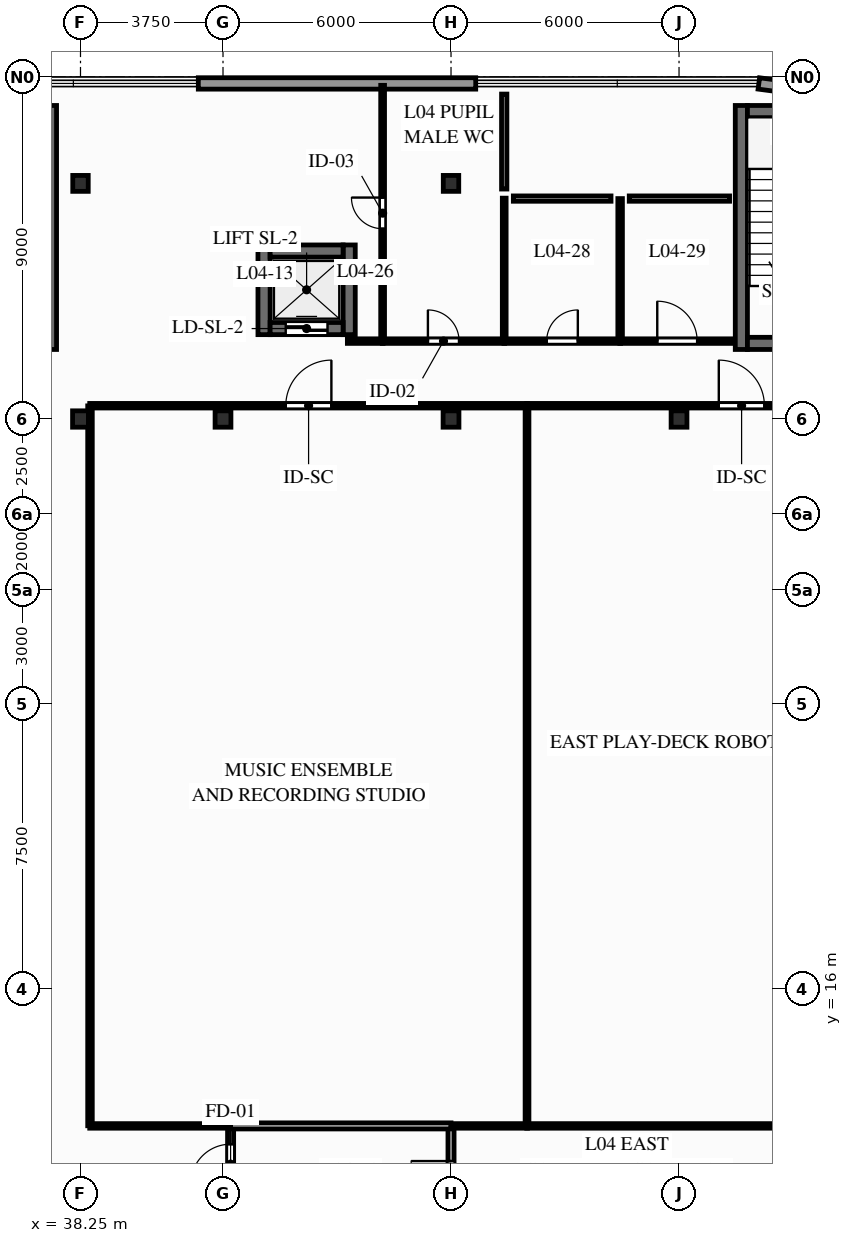
"""IFC4 building model, lengths in metres.
Left out: names, types, materials, properties, quantities, classifications, styles, units other than length and angle.
Written with IfcOpenShell. Run it as: python <this file> out.ifc"""

import sys

from ifc_helpers import new_model, si_unit, direction, frame, frame_2d, origin, origin_2d, place, context, subcontext, project, spatial, rectangle, i_section, extrude, element, fill, save


model = new_model("IFC4")
c1 = context("Model", 3, precision=1e-05, world=origin(), true_north=direction((0.0, 1.0)))
c2 = subcontext(c1, "Body", "Model", "MODEL_VIEW")
j1 = project(units=[si_unit("LENGTHUNIT", "METRE"), si_unit("PLANEANGLEUNIT", "RADIAN")], contexts=[c1])
p1 = place(None, origin())
s1 = spatial("IfcSite", under=j1, at=p1, CompositionType="ELEMENT")
p2 = place(p1, origin())
s2 = spatial("IfcBuilding", under=s1, at=p2, CompositionType="ELEMENT")
p3 = place(p2, frame((0.0, 0.0, 18.0)))
s3 = spatial("IfcBuildingStorey", under=s2, at=p3, CompositionType="ELEMENT", Elevation=18.0)
p4 = place(p3, frame((38.25, 31.0, 0.0), z_axis=(0.0, 0.0, 1.0), x_axis=(1.0, 0.0, 0.0)))
e1 = element("IfcColumn", 1, at=p4, inside=s3, PredefinedType="COLUMN", context=c2, shape_type="SweptSolid", body=[
    extrude(i_section(OverallWidth=0.417, OverallDepth=0.431, WebThickness=0.065, FlangeThickness=0.106, FilletRadius=0.015, at=origin_2d()), origin(), (0.0, 0.0, 1.0), 4.5),
])
p5 = place(p3, frame((38.25, 37.2, 0.0), z_axis=(0.0, 0.0, 1.0), x_axis=(1.0, 0.0, 0.0)))
e2 = element("IfcColumn", 2, at=p5, inside=s3, PredefinedType="COLUMN", context=c2, shape_type="SweptSolid", body=[
    extrude(i_section(OverallWidth=0.407, OverallDepth=0.419, WebThickness=0.031, FlangeThickness=0.049, FilletRadius=0.015, at=origin_2d()), origin(), (0.0, 0.0, 1.0), 4.5),
])
for number, where, z_axis, x_axis in (
    (3, (42.0, 31.0, 0.0), (0.0, 0.0, 1.0), (1.0, 0.0, 0.0)),
    (4, (48.0, 31.0, 0.0), (0.0, 0.0, 1.0), (1.0, 0.0, 0.0)),
):
    element("IfcColumn", number, at=place(p3, frame(where, z_axis=z_axis, x_axis=x_axis)), inside=s3, PredefinedType="COLUMN", context=c2, shape_type="SweptSolid", body=[
        extrude(i_section(OverallWidth=0.417, OverallDepth=0.431, WebThickness=0.065, FlangeThickness=0.106, FilletRadius=0.015, at=origin_2d()), origin(), (0.0, 0.0, 1.0), 4.5),
    ])
p6 = place(p3, frame((48.0, 37.2, 0.0), z_axis=(0.0, 0.0, 1.0), x_axis=(1.0, 0.0, 0.0)))
e5 = element("IfcColumn", 5, at=p6, inside=s3, PredefinedType="COLUMN", context=c2, shape_type="SweptSolid", body=[
    extrude(i_section(OverallWidth=0.407, OverallDepth=0.419, WebThickness=0.031, FlangeThickness=0.049, FilletRadius=0.015, at=origin_2d()), origin(), (0.0, 0.0, 1.0), 4.5),
])
p7 = place(p3, frame((54.0, 31.0, 0.0), z_axis=(0.0, 0.0, 1.0), x_axis=(1.0, 0.0, 0.0)))
e6 = element("IfcColumn", 6, at=p7, inside=s3, PredefinedType="COLUMN", context=c2, shape_type="SweptSolid", body=[
    extrude(i_section(OverallWidth=0.417, OverallDepth=0.431, WebThickness=0.065, FlangeThickness=0.106, FilletRadius=0.015, at=origin_2d()), origin(), (0.0, 0.0, 1.0), 4.5),
])
p8 = place(p3, frame((56.1, 39.83, 0.0), z_axis=(0.0, 0.0, 1.0), x_axis=(0.991442117533, -0.13054703207, 0.0)))
e7 = element("IfcWall", 7, at=p8, inside=s3, PredefinedType="STANDARD", context=c2, shape_type="SweptSolid", body=[
    extrude(rectangle(XDim=1.365, YDim=0.3, at=frame_2d((0.683, 0.0))), origin(), (0.0, 0.0, 1.0), 4.22),
])
p9 = place(p3, frame((41.35, 39.83, 0.0), z_axis=(0.0, 0.0, 1.0), x_axis=(1.0, 0.0, 0.0)))
e8 = element("IfcWall", 8, at=p9, inside=s3, PredefinedType="STANDARD", context=c2, shape_type="SweptSolid", body=[
    extrude(rectangle(XDim=7.3, YDim=0.3, at=frame_2d((3.65, 0.0))), origin(), (0.0, 0.0, 1.0), 4.22),
])
for number, where, z_axis, x_axis in (
    (9, (37.46, 32.83, 0.0), (0.0, 0.0, 1.0), (0.0, 1.0, 0.0)),
    (10, (55.64, 32.83, 0.0), (0.0, 0.0, 1.0), (0.0, 1.0, 0.0)),
):
    element("IfcWall", number, at=place(p3, frame(where, z_axis=z_axis, x_axis=x_axis)), inside=s3, PredefinedType="SHEAR", context=c2, shape_type="SweptSolid", body=[
        extrude(rectangle(XDim=6.42, YDim=0.32, at=frame_2d((3.21, 0.0))), origin(), (0.0, 0.0, 1.0), 4.22),
    ])
p10 = place(p3, frame((55.8, 32.99, 0.0), z_axis=(0.0, 0.0, 1.0), x_axis=(1.0, 0.0, 0.0)))
e11 = element("IfcWall", 11, at=p10, inside=s3, PredefinedType="SHEAR", context=c2, shape_type="SweptSolid", body=[
    extrude(rectangle(XDim=2.85, YDim=0.32, at=frame_2d((1.425, 0.0))), origin(), (0.0, 0.0, 1.0), 4.22),
])
p11 = place(p10, frame((0.9, 0.0, 0.0)))
e12 = element("IfcOpeningElement", 12, at=p11, cuts=e11, PredefinedType="OPENING", context=c2, shape_type="SweptSolid", body=[
    extrude(rectangle(XDim=1.05, YDim=2.06, at=frame_2d((0.525, 1.03))), frame((0.0, 0.17, 0.0), z_axis=(0.0, -1.0, 0.0), x_axis=(1.0, 0.0, 0.0)), (0.0, 0.0, 1.0), 0.34),
])
p12 = place(p3, frame((58.65, 39.09, 0.0), z_axis=(0.0, 0.0, 1.0), x_axis=(-1.0, 0.0, 0.0)))
e13 = element("IfcWall", 13, at=p12, inside=s3, PredefinedType="SHEAR", context=c2, shape_type="SweptSolid", body=[
    extrude(rectangle(XDim=2.85, YDim=0.32, at=frame_2d((1.425, 0.0))), origin(), (0.0, 0.0, 1.0), 4.22),
])
for number, where, z_axis, x_axis in (
    (14, (43.08, 33.22, 0.0), (0.0, 0.0, 1.0), (0.0, 1.0, 0.0)),
    (15, (45.32, 33.22, 0.0), (0.0, 0.0, 1.0), (0.0, 1.0, 0.0)),
):
    element("IfcWall", number, at=place(p3, frame(where, z_axis=z_axis, x_axis=x_axis)), inside=s3, PredefinedType="SHEAR", context=c2, shape_type="SweptSolid", body=[
        extrude(rectangle(XDim=2.36, YDim=0.32, at=frame_2d((1.18, 0.0))), origin(), (0.0, 0.0, 1.0), 4.22),
    ])
p13 = place(p3, frame((43.24, 33.38, 0.0), z_axis=(0.0, 0.0, 1.0), x_axis=(1.0, 0.0, 0.0)))
e16 = element("IfcWall", 16, at=p13, inside=s3, PredefinedType="SHEAR", context=c2, shape_type="SweptSolid", body=[
    extrude(rectangle(XDim=1.92, YDim=0.32, at=frame_2d((0.96, 0.0))), origin(), (0.0, 0.0, 1.0), 4.22),
])
p14 = place(p13, frame((0.41, 0.0, 0.0)))
e17 = element("IfcOpeningElement", 17, at=p14, cuts=e16, PredefinedType="OPENING", context=c2, shape_type="SweptSolid", body=[
    extrude(rectangle(XDim=1.1, YDim=2.06, at=frame_2d((0.55, 1.03))), frame((0.0, 0.17, 0.0), z_axis=(0.0, -1.0, 0.0), x_axis=(1.0, 0.0, 0.0)), (0.0, 0.0, 1.0), 0.34),
])
p15 = place(p3, frame((43.24, 35.42, 0.0), z_axis=(0.0, 0.0, 1.0), x_axis=(1.0, 0.0, 0.0)))
e18 = element("IfcWall", 18, at=p15, inside=s3, PredefinedType="SHEAR", context=c2, shape_type="SweptSolid", body=[
    extrude(rectangle(XDim=1.92, YDim=0.32, at=frame_2d((0.96, 0.0))), origin(), (0.0, 0.0, 1.0), 4.22),
])
p16 = place(p3, frame((42.2, 10.389, 0.0), z_axis=(0.0, 0.0, 1.0), x_axis=(0.0, 1.0, 0.0)))
e19 = element("IfcWall", 19, at=p16, inside=s3, PredefinedType="PARTITIONING", context=c2, shape_type="SweptSolid", body=[
    extrude(rectangle(XDim=2.011, YDim=0.16, at=frame_2d((1.006, 0.0))), origin(), (0.0, 0.0, 1.0), 3.344),
])
p17 = place(p16, frame((0.481, 0.0, 0.0)))
e20 = element("IfcOpeningElement", 20, at=p17, cuts=e19, PredefinedType="OPENING", context=c2, shape_type="SweptSolid", body=[
    extrude(rectangle(XDim=1.05, YDim=2.06, at=frame_2d((0.525, 1.03))), frame((0.0, 0.09, 0.0), z_axis=(0.0, -1.0, 0.0), x_axis=(1.0, 0.0, 0.0)), (0.0, 0.0, 1.0), 0.18),
])
p18 = place(p3, frame((48.0, 9.5, 0.0), z_axis=(0.0, 0.0, 1.0), x_axis=(0.0, 1.0, 0.0)))
e21 = element("IfcWall", 21, at=p18, inside=s3, PredefinedType="PARTITIONING", context=c2, shape_type="SweptSolid", body=[
    extrude(rectangle(XDim=2.9, YDim=0.16, at=frame_2d((1.45, 0.0))), origin(), (0.0, 0.0, 1.0), 3.344),
])
p19 = place(p18, frame((0.925, 0.0, 0.0)))
e22 = element("IfcOpeningElement", 22, at=p19, cuts=e21, PredefinedType="OPENING", context=c2, shape_type="SweptSolid", body=[
    extrude(rectangle(XDim=1.05, YDim=2.06, at=frame_2d((0.525, 1.03))), frame((0.0, 0.09, 0.0), z_axis=(0.0, -1.0, 0.0), x_axis=(1.0, 0.0, 0.0)), (0.0, 0.0, 1.0), 0.18),
])
p20 = place(p3, frame((42.2, 12.4, 0.0), z_axis=(0.0, 0.0, 1.0), x_axis=(1.0, 0.0, 0.0)))
e23 = element("IfcWall", 23, at=p20, inside=s3, PredefinedType="PARTITIONING", context=c2, shape_type="SweptSolid", body=[
    extrude(rectangle(XDim=5.8, YDim=0.16, at=frame_2d((2.9, 0.0))), origin(), (0.0, 0.0, 1.0), 3.344),
])
p21 = place(p3, frame((45.273, 33.05, 0.0), z_axis=(0.0, 0.0, 1.0), x_axis=(1.0, 0.0, 0.0)))
e24 = element("IfcWall", 24, at=p21, inside=s3, PredefinedType="PARTITIONING", context=c2, shape_type="SweptSolid", body=[
    extrude(rectangle(XDim=0.938, YDim=0.12, at=frame_2d((0.469, 0.0))), origin(), (0.0, 0.0, 1.0), 4.22),
])
p22 = place(p3, frame((46.193, 33.05, 0.0), z_axis=(0.0, 0.0, 1.0), x_axis=(1.0, 0.0, 0.0)))
e25 = element("IfcWall", 25, at=p22, inside=s3, PredefinedType="PARTITIONING", context=c2, shape_type="SweptSolid", body=[
    extrude(rectangle(XDim=3.219, YDim=0.12, at=frame_2d((1.609, 0.0))), origin(), (0.0, 0.0, 1.0), 3.344),
])
p23 = place(p22, frame((1.199, 0.0, 0.0)))
e26 = element("IfcOpeningElement", 26, at=p23, cuts=e25, PredefinedType="OPENING", context=c2, shape_type="SweptSolid", body=[
    extrude(rectangle(XDim=0.82, YDim=2.02, at=frame_2d((0.41, 1.01))), frame((0.0, 0.07, 0.0), z_axis=(0.0, -1.0, 0.0), x_axis=(1.0, 0.0, 0.0)), (0.0, 0.0, 1.0), 0.14),
])
p24 = place(p3, frame((49.393, 33.05, 0.0), z_axis=(0.0, 0.0, 1.0), x_axis=(1.0, 0.0, 0.0)))
e27 = element("IfcWall", 27, at=p24, inside=s3, PredefinedType="PARTITIONING", context=c2, shape_type="SweptSolid", body=[
    extrude(rectangle(XDim=3.069, YDim=0.12, at=frame_2d((1.534, 0.0))), origin(), (0.0, 0.0, 1.0), 4.22),
])
p25 = place(p24, frame((1.124, 0.0, 0.0)))
e28 = element("IfcOpeningElement", 28, at=p25, cuts=e27, PredefinedType="OPENING", context=c2, shape_type="SweptSolid", body=[
    extrude(rectangle(XDim=0.82, YDim=2.02, at=frame_2d((0.41, 1.01))), frame((0.0, 0.07, 0.0), z_axis=(0.0, -1.0, 0.0), x_axis=(1.0, 0.0, 0.0)), (0.0, 0.0, 1.0), 0.14),
])
p26 = place(p3, frame((52.443, 33.05, 0.0), z_axis=(0.0, 0.0, 1.0), x_axis=(1.0, 0.0, 0.0)))
e29 = element("IfcWall", 29, at=p26, inside=s3, PredefinedType="PARTITIONING", context=c2, shape_type="SweptSolid", body=[
    extrude(rectangle(XDim=3.019, YDim=0.12, at=frame_2d((1.509, 0.0))), origin(), (0.0, 0.0, 1.0), 4.22),
])
p27 = place(p26, frame((0.984, 0.0, 0.0)))
e30 = element("IfcOpeningElement", 30, at=p27, cuts=e29, PredefinedType="OPENING", context=c2, shape_type="SweptSolid", body=[
    extrude(rectangle(XDim=1.05, YDim=2.06, at=frame_2d((0.525, 1.03))), frame((0.0, 0.07, 0.0), z_axis=(0.0, -1.0, 0.0), x_axis=(1.0, 0.0, 0.0)), (0.0, 0.0, 1.0), 0.14),
])
p28 = place(p3, frame((38.493, 31.35, 0.0), z_axis=(0.0, 0.0, 1.0), x_axis=(1.0, 0.0, 0.0)))
e31 = element("IfcWall", 31, at=p28, inside=s3, PredefinedType="PARTITIONING", context=c2, shape_type="SweptSolid", body=[
    extrude(rectangle(XDim=11.519, YDim=0.12, at=frame_2d((5.759, 0.0))), origin(), (0.0, 0.0, 1.0), 3.344),
])
p29 = place(p28, frame((5.159, 0.0, 0.0)))
e32 = element("IfcOpeningElement", 32, at=p29, cuts=e31, PredefinedType="OPENING", context=c2, shape_type="SweptSolid", body=[
    extrude(rectangle(XDim=1.2, YDim=2.08, at=frame_2d((0.6, 1.04))), frame((0.0, 0.07, 0.0), z_axis=(0.0, -1.0, 0.0), x_axis=(1.0, 0.0, 0.0)), (0.0, 0.0, 1.0), 0.14),
])
p30 = place(p3, frame((49.993, 31.35, 0.0), z_axis=(0.0, 0.0, 1.0), x_axis=(1.0, 0.0, 0.0)))
e33 = element("IfcWall", 33, at=p30, inside=s3, PredefinedType="PARTITIONING", context=c2, shape_type="SweptSolid", body=[
    extrude(rectangle(XDim=11.307, YDim=0.12, at=frame_2d((5.654, 0.0))), origin(), (0.0, 0.0, 1.0), 4.22),
])
p31 = place(p30, frame((5.054, 0.0, 0.0)))
e34 = element("IfcOpeningElement", 34, at=p31, cuts=e33, PredefinedType="OPENING", context=c2, shape_type="SweptSolid", body=[
    extrude(rectangle(XDim=1.2, YDim=2.08, at=frame_2d((0.6, 1.04))), frame((0.0, 0.07, 0.0), z_axis=(0.0, -1.0, 0.0), x_axis=(1.0, 0.0, 0.0)), (0.0, 0.0, 1.0), 0.14),
])
p32 = place(p3, frame((38.493, 12.4, 0.0), z_axis=(0.0, 0.0, 1.0), x_axis=(1.0, 0.0, 0.0)))
e35 = element("IfcWall", 35, at=p32, inside=s3, PredefinedType="PARTITIONING", context=c2, shape_type="SweptSolid", body=[
    extrude(rectangle(XDim=3.703, YDim=0.12, at=frame_2d((1.852, 0.0))), origin(), (0.0, 0.0, 1.0), 3.344),
])
p33 = place(p3, frame((48.004, 12.4, 0.0), z_axis=(0.0, 0.0, 1.0), x_axis=(1.0, 0.0, 0.0)))
e36 = element("IfcWall", 36, at=p33, inside=s3, PredefinedType="PARTITIONING", context=c2, shape_type="SweptSolid", body=[
    extrude(rectangle(XDim=2.007, YDim=0.12, at=frame_2d((1.004, 0.0))), origin(), (0.0, 0.0, 1.0), 3.344),
])
p34 = place(p3, frame((49.993, 12.4, 0.0), z_axis=(0.0, 0.0, 1.0), x_axis=(1.0, 0.0, 0.0)))
e37 = element("IfcWall", 37, at=p34, inside=s3, PredefinedType="PARTITIONING", context=c2, shape_type="SweptSolid", body=[
    extrude(rectangle(XDim=7.257, YDim=0.12, at=frame_2d((3.629, 0.0))), origin(), (0.0, 0.0, 1.0), 3.344),
])
p35 = place(p3, frame((38.5, 12.404, 0.0), z_axis=(0.0, 0.0, 1.0), x_axis=(0.0, 1.0, 0.0)))
e38 = element("IfcWall", 38, at=p35, inside=s3, PredefinedType="PARTITIONING", context=c2, shape_type="SweptSolid", body=[
    extrude(rectangle(XDim=18.942, YDim=0.12, at=frame_2d((9.471, 0.0))), origin(), (0.0, 0.0, 1.0), 3.344),
])
p36 = place(p3, frame((46.2, 33.054, 0.0), z_axis=(0.0, 0.0, 1.0), x_axis=(0.0, 1.0, 0.0)))
e39 = element("IfcWall", 39, at=p36, inside=s3, PredefinedType="PARTITIONING", context=c2, shape_type="SweptSolid", body=[
    extrude(rectangle(XDim=6.726, YDim=0.1, at=frame_2d((3.363, 0.0))), origin(), (0.0, 0.0, 1.0), 3.583),
])
p37 = place(p36, frame((2.953, 0.0, 0.0)))
e40 = element("IfcOpeningElement", 40, at=p37, cuts=e39, PredefinedType="OPENING", context=c2, shape_type="SweptSolid", body=[
    extrude(rectangle(XDim=0.82, YDim=2.02, at=frame_2d((0.41, 1.01))), frame((0.0, 0.06, 0.0), z_axis=(0.0, -1.0, 0.0), x_axis=(1.0, 0.0, 0.0)), (0.0, 0.0, 1.0), 0.12),
])
p38 = place(p3, frame((49.4, 33.054, 0.0), z_axis=(0.0, 0.0, 1.0), x_axis=(0.0, 1.0, 0.0)))
e41 = element("IfcWall", 41, at=p38, inside=s3, PredefinedType="PARTITIONING", context=c2, shape_type="SweptSolid", body=[
    extrude(rectangle(XDim=3.757, YDim=0.1, at=frame_2d((1.879, 0.0))), origin(), (0.0, 0.0, 1.0), 4.22),
])
p39 = place(p3, frame((52.45, 33.054, 0.0), z_axis=(0.0, 0.0, 1.0), x_axis=(0.0, 1.0, 0.0)))
e42 = element("IfcWall", 42, at=p39, inside=s3, PredefinedType="PARTITIONING", context=c2, shape_type="SweptSolid", body=[
    extrude(rectangle(XDim=3.746, YDim=0.12, at=frame_2d((1.873, 0.0))), origin(), (0.0, 0.0, 1.0), 4.22),
])
p40 = place(p3, frame((50.0, 12.404, 0.0), z_axis=(0.0, 0.0, 1.0), x_axis=(0.0, 1.0, 0.0)))
e43 = element("IfcWall", 43, at=p40, inside=s3, PredefinedType="PARTITIONING", context=c2, shape_type="SweptSolid", body=[
    extrude(rectangle(XDim=18.942, YDim=0.1, at=frame_2d((9.471, 0.0))), origin(), (0.0, 0.0, 1.0), 3.583),
])
p41 = place(p3, frame((49.4, 37.051, 0.0), z_axis=(0.0, 0.0, 1.0), x_axis=(0.0, 1.0, 0.0)))
e44 = element("IfcWall", 44, at=p41, inside=s3, PredefinedType="PARTITIONING", context=c2, shape_type="SweptSolid", body=[
    extrude(rectangle(XDim=2.499, YDim=0.14, at=frame_2d((1.25, 0.0))), origin(), (0.0, 0.0, 1.0), 4.22),
])
p42 = place(p3, frame((49.64, 36.8, 0.0), z_axis=(0.0, 0.0, 1.0), x_axis=(1.0, 0.0, 0.0)))
e45 = element("IfcWall", 45, at=p42, inside=s3, PredefinedType="PARTITIONING", context=c2, shape_type="SweptSolid", body=[
    extrude(rectangle(XDim=2.57, YDim=0.14, at=frame_2d((1.285, 0.0))), origin(), (0.0, 0.0, 1.0), 4.22),
])
p43 = place(p3, frame((52.69, 36.8, 0.0), z_axis=(0.0, 0.0, 1.0), x_axis=(1.0, 0.0, 0.0)))
e46 = element("IfcWall", 46, at=p43, inside=s3, PredefinedType="PARTITIONING", context=c2, shape_type="SweptSolid", body=[
    extrude(rectangle(XDim=2.64, YDim=0.14, at=frame_2d((1.32, 0.0))), origin(), (0.0, 0.0, 1.0), 4.22),
])
p44 = place(p14, origin())
e47 = element("IfcDoor", 47, at=p44, inside=s3, OperationType="SLIDING_TO_LEFT", PredefinedType="DOOR", context=c2, shape_type="SweptSolid", body=[
    extrude(rectangle(XDim=1.1, YDim=2.06, at=frame_2d((0.55, 1.03))), frame((0.0, 0.025, 0.0), z_axis=(0.0, -1.0, 0.0), x_axis=(1.0, 0.0, 0.0)), (0.0, 0.0, 1.0), 0.05),
])
fill(e17, e47)
p45 = place(p17, origin())
e48 = element("IfcDoor", 48, at=p45, inside=s3, OperationType="SINGLE_SWING_LEFT", PredefinedType="DOOR", context=c2, shape_type="SweptSolid", body=[
    extrude(rectangle(XDim=1.05, YDim=2.06, at=frame_2d((0.525, 1.03))), frame((0.0, 0.025, 0.0), z_axis=(0.0, -1.0, 0.0), x_axis=(1.0, 0.0, 0.0)), (0.0, 0.0, 1.0), 0.05),
])
fill(e20, e48)
p46 = place(p19, origin())
e49 = element("IfcDoor", 49, at=p46, inside=s3, OperationType="SINGLE_SWING_RIGHT", PredefinedType="DOOR", context=c2, shape_type="SweptSolid", body=[
    extrude(rectangle(XDim=1.05, YDim=2.06, at=frame_2d((0.525, 1.03))), frame((0.0, 0.025, 0.0), z_axis=(0.0, -1.0, 0.0), x_axis=(1.0, 0.0, 0.0)), (0.0, 0.0, 1.0), 0.05),
])
fill(e22, e49)
p47 = place(p23, origin())
e50 = element("IfcDoor", 50, at=p47, inside=s3, OperationType="SINGLE_SWING_LEFT", PredefinedType="DOOR", context=c2, shape_type="SweptSolid", body=[
    extrude(rectangle(XDim=0.82, YDim=2.02, at=frame_2d((0.41, 1.01))), frame((0.0, 0.025, 0.0), z_axis=(0.0, -1.0, 0.0), x_axis=(1.0, 0.0, 0.0)), (0.0, 0.0, 1.0), 0.05),
])
fill(e26, e50)
p48 = place(p25, origin())
e51 = element("IfcDoor", 51, at=p48, inside=s3, OperationType="SINGLE_SWING_RIGHT", PredefinedType="DOOR", context=c2, shape_type="SweptSolid", body=[
    extrude(rectangle(XDim=0.82, YDim=2.02, at=frame_2d((0.41, 1.01))), frame((0.0, 0.025, 0.0), z_axis=(0.0, -1.0, 0.0), x_axis=(1.0, 0.0, 0.0)), (0.0, 0.0, 1.0), 0.05),
])
fill(e28, e51)
p49 = place(p27, origin())
e52 = element("IfcDoor", 52, at=p49, inside=s3, OperationType="SINGLE_SWING_LEFT", PredefinedType="DOOR", context=c2, shape_type="SweptSolid", body=[
    extrude(rectangle(XDim=1.05, YDim=2.06, at=frame_2d((0.525, 1.03))), frame((0.0, 0.025, 0.0), z_axis=(0.0, -1.0, 0.0), x_axis=(1.0, 0.0, 0.0)), (0.0, 0.0, 1.0), 0.05),
])
fill(e30, e52)
p50 = place(p29, origin())
e53 = element("IfcDoor", 53, at=p50, inside=s3, OperationType="SINGLE_SWING_RIGHT", PredefinedType="DOOR", context=c2, shape_type="SweptSolid", body=[
    extrude(rectangle(XDim=1.2, YDim=2.08, at=frame_2d((0.6, 1.04))), frame((0.0, 0.025, 0.0), z_axis=(0.0, -1.0, 0.0), x_axis=(1.0, 0.0, 0.0)), (0.0, 0.0, 1.0), 0.05),
])
fill(e32, e53)
p51 = place(p31, origin())
e54 = element("IfcDoor", 54, at=p51, inside=s3, OperationType="SINGLE_SWING_LEFT", PredefinedType="DOOR", context=c2, shape_type="SweptSolid", body=[
    extrude(rectangle(XDim=1.2, YDim=2.08, at=frame_2d((0.6, 1.04))), frame((0.0, 0.025, 0.0), z_axis=(0.0, -1.0, 0.0), x_axis=(1.0, 0.0, 0.0)), (0.0, 0.0, 1.0), 0.05),
])
fill(e34, e54)
p52 = place(p37, origin())
e55 = element("IfcDoor", 55, at=p52, inside=s3, OperationType="SINGLE_SWING_RIGHT", PredefinedType="DOOR", context=c2, shape_type="SweptSolid", body=[
    extrude(rectangle(XDim=0.82, YDim=2.02, at=frame_2d((0.41, 1.01))), frame((0.0, 0.025, 0.0), z_axis=(0.0, -1.0, 0.0), x_axis=(1.0, 0.0, 0.0)), (0.0, 0.0, 1.0), 0.05),
])
fill(e40, e55)
save(model, sys.argv[1])
